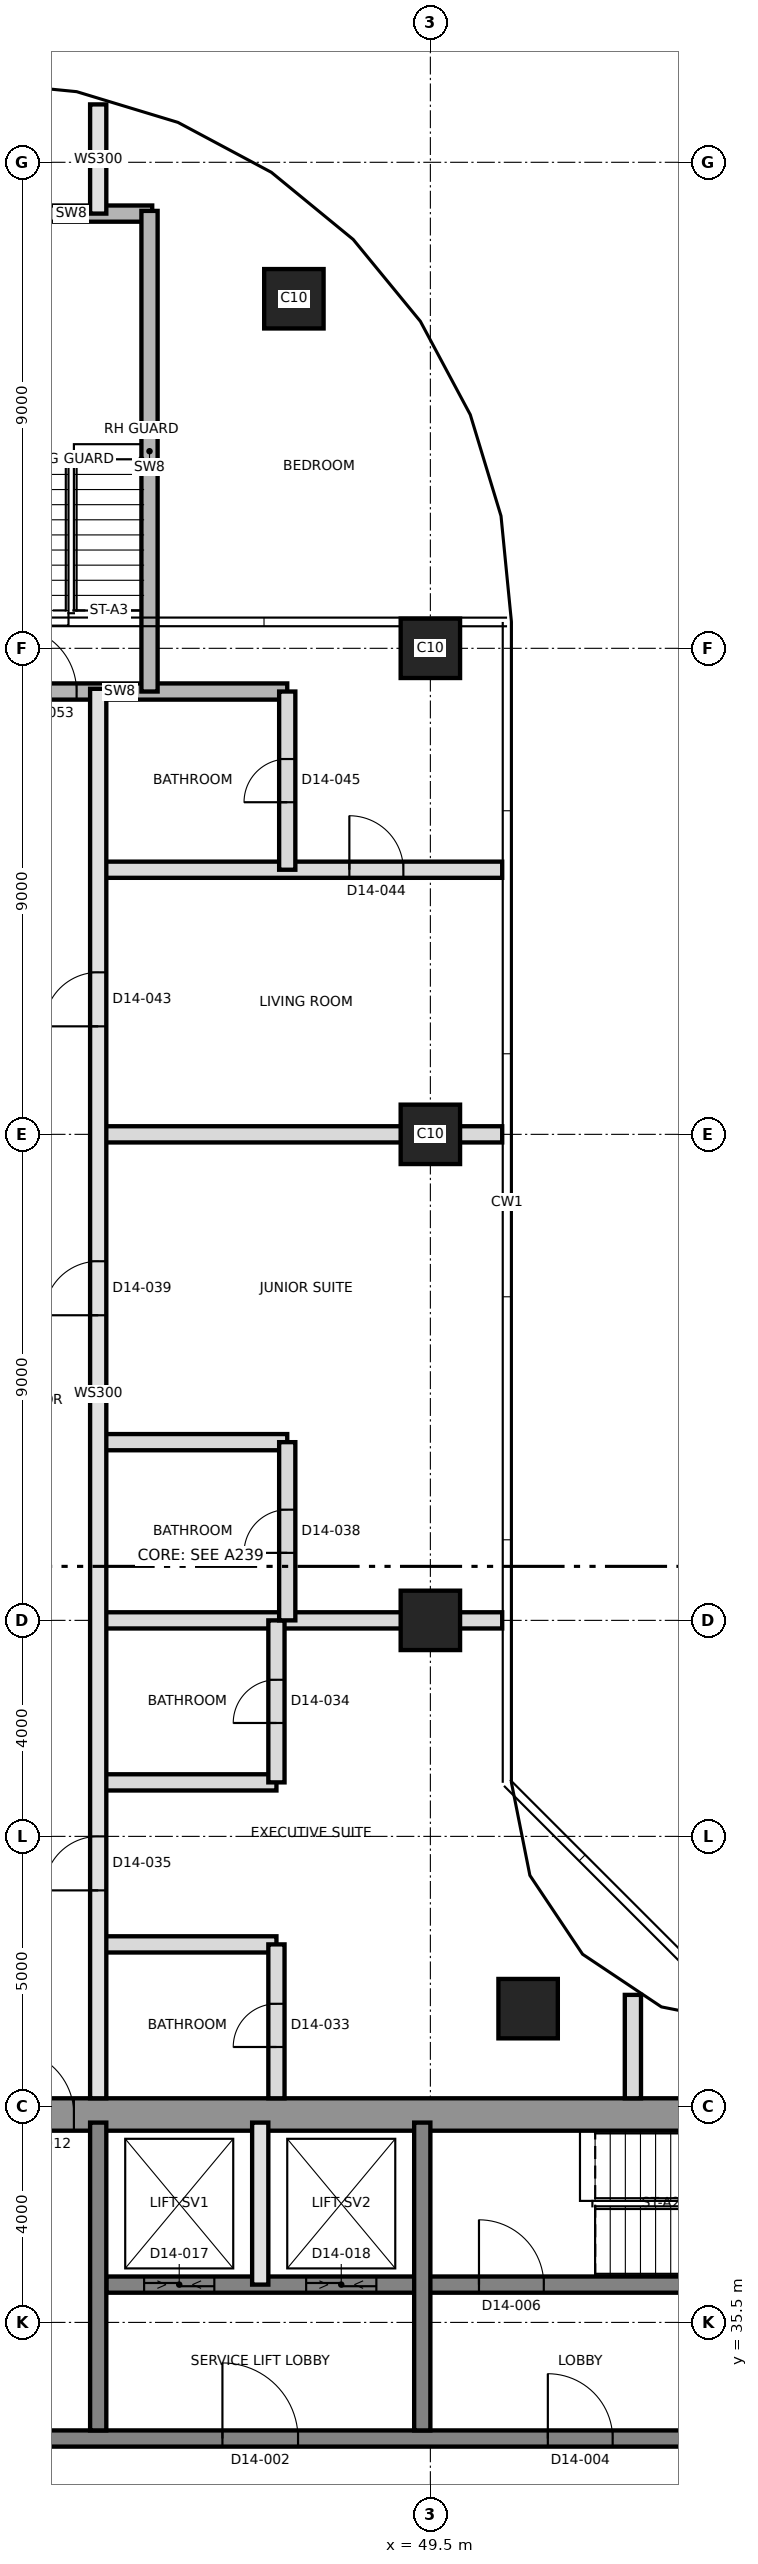
"""IFC4 building model, lengths in metres.
Left out: names, types, materials, properties, quantities, classifications, styles, units other than length and angle.
Written with IfcOpenShell. Run it as: python <this file> out.ifc"""

import sys

from ifc_helpers import new_model, si_unit, direction, frame, frame_2d, origin, origin_2d, place, context, subcontext, project, spatial, rectangle, extrude, element, fill, save


model = new_model("IFC4")
c1 = context("Model", 3, precision=1e-05, world=origin(), true_north=direction((0.0, 1.0)))
c2 = subcontext(c1, "Body", "Model", "MODEL_VIEW")
j1 = project(units=[si_unit("LENGTHUNIT", "METRE"), si_unit("PLANEANGLEUNIT", "RADIAN")], contexts=[c1])
p1 = place(None, origin())
s1 = spatial("IfcSite", under=j1, at=p1, CompositionType="ELEMENT")
p2 = place(p1, origin())
s2 = spatial("IfcBuilding", under=s1, at=p2, CompositionType="ELEMENT")
p3 = place(p2, frame((0.0, 0.0, 149.6)))
s3 = spatial("IfcBuildingStorey", under=s2, at=p3, CompositionType="ELEMENT", Elevation=149.6)
p4 = place(p3, frame((31.2, 39.35, 0.0), z_axis=(0.0, 0.0, 1.0), x_axis=(1.0, 0.0, 0.0)))
e1 = element("IfcWall", 1, at=p4, inside=s3, PredefinedType="SHEAR", context=c2, shape_type="SweptSolid", body=[
    extrude(rectangle(XDim=27.0, YDim=0.6, at=frame_2d((13.5, 0.0))), origin(), (0.0, 0.0, 1.0), 3.7),
])
p5 = place(p4, frame((10.5, 0.0, 0.0)))
e2 = element("IfcOpeningElement", 2, at=p5, cuts=e1, PredefinedType="OPENING", context=c2, shape_type="SweptSolid", body=[
    extrude(rectangle(XDim=1.2, YDim=2.1, at=frame_2d((0.6, 1.05))), frame((0.0, 0.31, 0.0), z_axis=(0.0, -1.0, 0.0), x_axis=(1.0, 0.0, 0.0)), (0.0, 0.0, 1.0), 0.62),
])
p6 = place(p3, frame((31.8, 33.35, 0.0), z_axis=(0.0, 0.0, 1.0), x_axis=(1.0, 0.0, 0.0)))
e3 = element("IfcWall", 3, at=p6, inside=s3, PredefinedType="SHEAR", context=c2, shape_type="SweptSolid", body=[
    extrude(rectangle(XDim=26.4, YDim=0.3, at=frame_2d((13.2, 0.0))), origin(), (0.0, 0.0, 1.0), 3.7),
])
p7 = place(p6, frame((13.85, 0.0, 0.0)))
e4 = element("IfcOpeningElement", 4, at=p7, cuts=e3, PredefinedType="OPENING", context=c2, shape_type="SweptSolid", body=[
    extrude(rectangle(XDim=1.4, YDim=2.1, at=frame_2d((0.7, 1.05))), frame((0.0, 0.16, 0.0), z_axis=(0.0, -1.0, 0.0), x_axis=(1.0, 0.0, 0.0)), (0.0, 0.0, 1.0), 0.32),
])
p8 = place(p6, frame((5.325, 0.0, 0.0)))
e5 = element("IfcOpeningElement", 5, at=p8, cuts=e3, PredefinedType="OPENING", context=c2, shape_type="SweptSolid", body=[
    extrude(rectangle(XDim=1.2, YDim=2.1, at=frame_2d((0.6, 1.05))), frame((0.0, 0.16, 0.0), z_axis=(0.0, -1.0, 0.0), x_axis=(1.0, 0.0, 0.0)), (0.0, 0.0, 1.0), 0.32),
])
p9 = place(p6, frame((19.875, 0.0, 0.0)))
e6 = element("IfcOpeningElement", 6, at=p9, cuts=e3, PredefinedType="OPENING", context=c2, shape_type="SweptSolid", body=[
    extrude(rectangle(XDim=1.2, YDim=2.1, at=frame_2d((0.6, 1.05))), frame((0.0, 0.16, 0.0), z_axis=(0.0, -1.0, 0.0), x_axis=(1.0, 0.0, 0.0)), (0.0, 0.0, 1.0), 0.32),
])
p10 = place(p3, frame((43.5, 36.2, 0.0), z_axis=(0.0, 0.0, 1.0), x_axis=(1.0, 0.0, 0.0)))
e7 = element("IfcWall", 7, at=p10, inside=s3, PredefinedType="SHEAR", context=c2, shape_type="SweptSolid", body=[
    extrude(rectangle(XDim=14.7, YDim=0.3, at=frame_2d((7.35, 0.0))), origin(), (0.0, 0.0, 1.0), 3.7),
])
p11 = place(p10, frame((6.9, 0.0, 0.0)))
e8 = element("IfcOpeningElement", 8, at=p11, cuts=e7, PredefinedType="OPENING", context=c2, shape_type="SweptSolid", body=[
    extrude(rectangle(XDim=1.2, YDim=2.1, at=frame_2d((0.6, 1.05))), frame((0.0, 0.16, 0.0), z_axis=(0.0, -1.0, 0.0), x_axis=(1.0, 0.0, 0.0)), (0.0, 0.0, 1.0), 0.32),
])
p12 = place(p10, frame((0.7, 0.0, 0.0)))
e9 = element("IfcOpeningElement", 9, at=p12, cuts=e7, PredefinedType="OPENING", context=c2, shape_type="SweptSolid", body=[
    extrude(rectangle(XDim=1.3, YDim=2.4, at=frame_2d((0.65, 1.2))), frame((0.0, 0.16, 0.0), z_axis=(0.0, -1.0, 0.0), x_axis=(1.0, 0.0, 0.0)), (0.0, 0.0, 1.0), 0.32),
])
p13 = place(p10, frame((3.7, 0.0, 0.0)))
e10 = element("IfcOpeningElement", 10, at=p13, cuts=e7, PredefinedType="OPENING", context=c2, shape_type="SweptSolid", body=[
    extrude(rectangle(XDim=1.3, YDim=2.4, at=frame_2d((0.65, 1.2))), frame((0.0, 0.16, 0.0), z_axis=(0.0, -1.0, 0.0), x_axis=(1.0, 0.0, 0.0)), (0.0, 0.0, 1.0), 0.32),
])
for number, where, z_axis, x_axis in (
    (11, (43.35, 33.5, 0.0), (0.0, 0.0, 1.0), (0.0, 1.0, 0.0)),
    (12, (49.35, 33.5, 0.0), (0.0, 0.0, 1.0), (0.0, 1.0, 0.0)),
):
    element("IfcWall", number, at=place(p3, frame(where, z_axis=z_axis, x_axis=x_axis)), inside=s3, PredefinedType="SHEAR", context=c2, shape_type="SweptSolid", body=[
        extrude(rectangle(XDim=5.7, YDim=0.3, at=frame_2d((2.85, 0.0))), origin(), (0.0, 0.0, 1.0), 3.7),
    ])
for number, where, z_axis, x_axis in (
    (13, (51.31, 41.31, 0.0), (0.0, 0.0, 1.0), (1.0, 0.0, 0.0)),
    (14, (49.5, 48.5, 0.0), (0.0, 0.0, 1.0), (1.0, 0.0, 0.0)),
    (15, (49.5, 57.5, 0.0), (0.0, 0.0, 1.0), (1.0, 0.0, 0.0)),
    (16, (49.5, 66.5, 0.0), (0.0, 0.0, 1.0), (1.0, 0.0, 0.0)),
    (17, (46.973, 72.973, 0.0), (0.0, 0.0, 1.0), (1.0, 0.0, 0.0)),
):
    element("IfcColumn", number, at=place(p3, frame(where, z_axis=z_axis, x_axis=x_axis)), inside=s3, PredefinedType="COLUMN", context=c2, shape_type="SweptSolid", body=[
        extrude(rectangle(XDim=1.1, YDim=1.1, at=origin_2d()), origin(), (0.0, 0.0, 1.0), 3.7),
    ])
p14 = place(p3, frame((46.35, 36.2, 0.0), z_axis=(0.0, 0.0, 1.0), x_axis=(0.0, 1.0, 0.0)))
e18 = element("IfcWall", 18, at=p14, inside=s3, PredefinedType="SOLIDWALL", context=c2, shape_type="SweptSolid", body=[
    extrude(rectangle(XDim=3.0, YDim=0.3, at=frame_2d((1.5, 0.0))), origin(), (0.0, 0.0, 1.0), 3.4),
])
for number, where, z_axis, x_axis in (
    (19, (43.35, 42.5, 0.0), (0.0, 0.0, 1.0), (1.0, 0.0, 0.0)),
    (20, (43.35, 45.5, 0.0), (0.0, 0.0, 1.0), (1.0, 0.0, 0.0)),
):
    element("IfcWall", number, at=place(p3, frame(where, z_axis=z_axis, x_axis=x_axis)), inside=s3, PredefinedType="PARTITIONING", context=c2, shape_type="SweptSolid", body=[
        extrude(rectangle(XDim=3.3, YDim=0.3, at=frame_2d((1.65, 0.0))), origin(), (0.0, 0.0, 1.0), 3.4),
    ])
p15 = place(p3, frame((43.35, 48.5, 0.0), z_axis=(0.0, 0.0, 1.0), x_axis=(1.0, 0.0, 0.0)))
e21 = element("IfcWall", 21, at=p15, inside=s3, PredefinedType="PARTITIONING", context=c2, shape_type="SweptSolid", body=[
    extrude(rectangle(XDim=7.48, YDim=0.3, at=frame_2d((3.74, 0.0))), origin(), (0.0, 0.0, 1.0), 3.35),
])
p16 = place(p3, frame((43.35, 51.8, 0.0), z_axis=(0.0, 0.0, 1.0), x_axis=(1.0, 0.0, 0.0)))
e22 = element("IfcWall", 22, at=p16, inside=s3, PredefinedType="PARTITIONING", context=c2, shape_type="SweptSolid", body=[
    extrude(rectangle(XDim=3.5, YDim=0.3, at=frame_2d((1.75, 0.0))), origin(), (0.0, 0.0, 1.0), 3.4),
])
p17 = place(p3, frame((43.35, 57.5, 0.0), z_axis=(0.0, 0.0, 1.0), x_axis=(1.0, 0.0, 0.0)))
e23 = element("IfcWall", 23, at=p17, inside=s3, PredefinedType="PARTITIONING", context=c2, shape_type="SweptSolid", body=[
    extrude(rectangle(XDim=7.48, YDim=0.3, at=frame_2d((3.74, 0.0))), origin(), (0.0, 0.0, 1.0), 3.35),
])
p18 = place(p3, frame((43.35, 62.4, 0.0), z_axis=(0.0, 0.0, 1.0), x_axis=(1.0, 0.0, 0.0)))
e24 = element("IfcWall", 24, at=p18, inside=s3, PredefinedType="PARTITIONING", context=c2, shape_type="SweptSolid", body=[
    extrude(rectangle(XDim=7.48, YDim=0.3, at=frame_2d((3.74, 0.0))), origin(), (0.0, 0.0, 1.0), 3.35),
])
p19 = place(p18, frame((4.65, 0.0, 0.0)))
e25 = element("IfcOpeningElement", 25, at=p19, cuts=e24, PredefinedType="OPENING", context=c2, shape_type="SweptSolid", body=[
    extrude(rectangle(XDim=1.0, YDim=2.1, at=frame_2d((0.5, 1.05))), frame((0.0, 0.16, 0.0), z_axis=(0.0, -1.0, 0.0), x_axis=(1.0, 0.0, 0.0)), (0.0, 0.0, 1.0), 0.32),
])
p20 = place(p3, frame((40.65, 65.7, 0.0), z_axis=(0.0, 0.0, 1.0), x_axis=(1.0, 0.0, 0.0)))
e26 = element("IfcWall", 26, at=p20, inside=s3, PredefinedType="SHEAR", context=c2, shape_type="SweptSolid", body=[
    extrude(rectangle(XDim=6.2, YDim=0.3, at=frame_2d((3.1, 0.0))), origin(), (0.0, 0.0, 1.0), 3.4),
])
p21 = place(p20, frame((1.1, 0.0, 0.0)))
e27 = element("IfcOpeningElement", 27, at=p21, cuts=e26, PredefinedType="OPENING", context=c2, shape_type="SweptSolid", body=[
    extrude(rectangle(XDim=1.2, YDim=2.1, at=frame_2d((0.6, 1.05))), frame((0.0, 0.16, 0.0), z_axis=(0.0, -1.0, 0.0), x_axis=(1.0, 0.0, 0.0)), (0.0, 0.0, 1.0), 0.32),
])
p22 = place(p3, frame((41.35, 74.55, 0.0), z_axis=(0.0, 0.0, 1.0), x_axis=(1.0, 0.0, 0.0)))
e28 = element("IfcWall", 28, at=p22, inside=s3, PredefinedType="SHEAR", context=c2, shape_type="SweptSolid", body=[
    extrude(rectangle(XDim=3.0, YDim=0.3, at=frame_2d((1.5, 0.0))), origin(), (0.0, 0.0, 1.0), 3.4),
])
p23 = place(p3, frame((43.35, 39.65, 0.0), z_axis=(0.0, 0.0, 1.0), x_axis=(0.0, 1.0, 0.0)))
e29 = element("IfcWall", 29, at=p23, inside=s3, PredefinedType="SOLIDWALL", context=c2, shape_type="SweptSolid", body=[
    extrude(rectangle(XDim=26.1, YDim=0.3, at=frame_2d((13.05, 0.0))), origin(), (0.0, 0.0, 1.0), 3.4),
])
p24 = place(p23, frame((3.85, 0.0, 0.0)))
e30 = element("IfcOpeningElement", 30, at=p24, cuts=e29, PredefinedType="OPENING", context=c2, shape_type="SweptSolid", body=[
    extrude(rectangle(XDim=1.0, YDim=2.4, at=frame_2d((0.5, 1.2))), frame((0.0, 0.16, 0.0), z_axis=(0.0, -1.0, 0.0), x_axis=(1.0, 0.0, 0.0)), (0.0, 0.0, 1.0), 0.32),
])
p25 = place(p23, frame((14.5, 0.0, 0.0)))
e31 = element("IfcOpeningElement", 31, at=p25, cuts=e29, PredefinedType="OPENING", context=c2, shape_type="SweptSolid", body=[
    extrude(rectangle(XDim=1.0, YDim=2.4, at=frame_2d((0.5, 1.2))), frame((0.0, 0.16, 0.0), z_axis=(0.0, -1.0, 0.0), x_axis=(1.0, 0.0, 0.0)), (0.0, 0.0, 1.0), 0.32),
])
p26 = place(p23, frame((19.85, 0.0, 0.0)))
e32 = element("IfcOpeningElement", 32, at=p26, cuts=e29, PredefinedType="OPENING", context=c2, shape_type="SweptSolid", body=[
    extrude(rectangle(XDim=1.0, YDim=2.4, at=frame_2d((0.5, 1.2))), frame((0.0, 0.16, 0.0), z_axis=(0.0, -1.0, 0.0), x_axis=(1.0, 0.0, 0.0)), (0.0, 0.0, 1.0), 0.32),
])
p27 = place(p3, frame((43.35, 74.55, 0.0), z_axis=(0.0, 0.0, 1.0), x_axis=(0.0, 1.0, 0.0)))
e33 = element("IfcWall", 33, at=p27, inside=s3, PredefinedType="SOLIDWALL", context=c2, shape_type="SweptSolid", body=[
    extrude(rectangle(XDim=2.022, YDim=0.3, at=frame_2d((1.011, 0.0))), origin(), (0.0, 0.0, 1.0), 3.35),
])
p28 = place(p3, frame((44.3, 65.7, 0.0), z_axis=(0.0, 0.0, 1.0), x_axis=(0.0, 1.0, 0.0)))
e34 = element("IfcWall", 34, at=p28, inside=s3, PredefinedType="SHEAR", context=c2, shape_type="SweptSolid", body=[
    extrude(rectangle(XDim=8.9, YDim=0.3, at=frame_2d((4.45, 0.0))), origin(), (0.0, 0.0, 1.0), 3.4),
])
p29 = place(p3, frame((46.65, 39.65, 0.0), z_axis=(0.0, 0.0, 1.0), x_axis=(0.0, 1.0, 0.0)))
e35 = element("IfcWall", 35, at=p29, inside=s3, PredefinedType="PARTITIONING", context=c2, shape_type="SweptSolid", body=[
    extrude(rectangle(XDim=2.85, YDim=0.3, at=frame_2d((1.425, 0.0))), origin(), (0.0, 0.0, 1.0), 3.4),
])
p30 = place(p29, frame((0.95, 0.0, 0.0)))
e36 = element("IfcOpeningElement", 36, at=p30, cuts=e35, PredefinedType="OPENING", context=c2, shape_type="SweptSolid", body=[
    extrude(rectangle(XDim=0.8, YDim=2.1, at=frame_2d((0.4, 1.05))), frame((0.0, 0.16, 0.0), z_axis=(0.0, -1.0, 0.0), x_axis=(1.0, 0.0, 0.0)), (0.0, 0.0, 1.0), 0.32),
])
p31 = place(p3, frame((46.65, 45.5, 0.0), z_axis=(0.0, 0.0, 1.0), x_axis=(0.0, 1.0, 0.0)))
e37 = element("IfcWall", 37, at=p31, inside=s3, PredefinedType="PARTITIONING", context=c2, shape_type="SweptSolid", body=[
    extrude(rectangle(XDim=3.0, YDim=0.3, at=frame_2d((1.5, 0.0))), origin(), (0.0, 0.0, 1.0), 3.4),
])
p32 = place(p31, frame((1.1, 0.0, 0.0)))
e38 = element("IfcOpeningElement", 38, at=p32, cuts=e37, PredefinedType="OPENING", context=c2, shape_type="SweptSolid", body=[
    extrude(rectangle(XDim=0.8, YDim=2.1, at=frame_2d((0.4, 1.05))), frame((0.0, 0.16, 0.0), z_axis=(0.0, -1.0, 0.0), x_axis=(1.0, 0.0, 0.0)), (0.0, 0.0, 1.0), 0.32),
])
p33 = place(p3, frame((46.85, 48.5, 0.0), z_axis=(0.0, 0.0, 1.0), x_axis=(0.0, 1.0, 0.0)))
e39 = element("IfcWall", 39, at=p33, inside=s3, PredefinedType="PARTITIONING", context=c2, shape_type="SweptSolid", body=[
    extrude(rectangle(XDim=3.3, YDim=0.3, at=frame_2d((1.65, 0.0))), origin(), (0.0, 0.0, 1.0), 3.4),
])
p34 = place(p33, frame((1.25, 0.0, 0.0)))
e40 = element("IfcOpeningElement", 40, at=p34, cuts=e39, PredefinedType="OPENING", context=c2, shape_type="SweptSolid", body=[
    extrude(rectangle(XDim=0.8, YDim=2.1, at=frame_2d((0.4, 1.05))), frame((0.0, 0.16, 0.0), z_axis=(0.0, -1.0, 0.0), x_axis=(1.0, 0.0, 0.0)), (0.0, 0.0, 1.0), 0.32),
])
p35 = place(p3, frame((46.85, 62.4, 0.0), z_axis=(0.0, 0.0, 1.0), x_axis=(0.0, 1.0, 0.0)))
e41 = element("IfcWall", 41, at=p35, inside=s3, PredefinedType="PARTITIONING", context=c2, shape_type="SweptSolid", body=[
    extrude(rectangle(XDim=3.3, YDim=0.3, at=frame_2d((1.65, 0.0))), origin(), (0.0, 0.0, 1.0), 3.4),
])
p36 = place(p35, frame((1.25, 0.0, 0.0)))
e42 = element("IfcOpeningElement", 42, at=p36, cuts=e41, PredefinedType="OPENING", context=c2, shape_type="SweptSolid", body=[
    extrude(rectangle(XDim=0.8, YDim=2.1, at=frame_2d((0.4, 1.05))), frame((0.0, 0.16, 0.0), z_axis=(0.0, -1.0, 0.0), x_axis=(1.0, 0.0, 0.0)), (0.0, 0.0, 1.0), 0.32),
])
p37 = place(p3, frame((53.25, 39.65, 0.0), z_axis=(0.0, 0.0, 1.0), x_axis=(0.0, 1.0, 0.0)))
e43 = element("IfcWall", 43, at=p37, inside=s3, PredefinedType="PARTITIONING", context=c2, shape_type="SweptSolid", body=[
    extrude(rectangle(XDim=1.915, YDim=0.3, at=frame_2d((0.958, 0.0))), origin(), (0.0, 0.0, 1.0), 3.35),
])
p38 = place(p7, origin())
e44 = element("IfcDoor", 44, at=p38, inside=s3, OperationType="SINGLE_SWING_RIGHT", PredefinedType="DOOR", context=c2, shape_type="SweptSolid", body=[
    extrude(rectangle(XDim=1.4, YDim=2.1, at=frame_2d((0.7, 1.05))), frame((0.0, 0.025, 0.0), z_axis=(0.0, -1.0, 0.0), x_axis=(1.0, 0.0, 0.0)), (0.0, 0.0, 1.0), 0.05),
])
fill(e4, e44)
p39 = place(p9, origin())
e45 = element("IfcDoor", 45, at=p39, inside=s3, OperationType="SINGLE_SWING_RIGHT", PredefinedType="DOOR", context=c2, shape_type="SweptSolid", body=[
    extrude(rectangle(XDim=1.2, YDim=2.1, at=frame_2d((0.6, 1.05))), frame((0.0, 0.025, 0.0), z_axis=(0.0, -1.0, 0.0), x_axis=(1.0, 0.0, 0.0)), (0.0, 0.0, 1.0), 0.05),
])
fill(e6, e45)
p40 = place(p11, origin())
e46 = element("IfcDoor", 46, at=p40, inside=s3, OperationType="SINGLE_SWING_LEFT", PredefinedType="DOOR", context=c2, shape_type="SweptSolid", body=[
    extrude(rectangle(XDim=1.2, YDim=2.1, at=frame_2d((0.6, 1.05))), frame((0.0, 0.025, 0.0), z_axis=(0.0, -1.0, 0.0), x_axis=(1.0, 0.0, 0.0)), (0.0, 0.0, 1.0), 0.05),
])
fill(e8, e46)
p41 = place(p5, origin())
e47 = element("IfcDoor", 47, at=p41, inside=s3, OperationType="SINGLE_SWING_RIGHT", PredefinedType="DOOR", context=c2, shape_type="SweptSolid", body=[
    extrude(rectangle(XDim=1.2, YDim=2.1, at=frame_2d((0.6, 1.05))), frame((0.0, 0.025, 0.0), z_axis=(0.0, -1.0, 0.0), x_axis=(1.0, 0.0, 0.0)), (0.0, 0.0, 1.0), 0.05),
])
fill(e2, e47)
p42 = place(p12, origin())
e48 = element("IfcDoor", 48, at=p42, inside=s3, OperationType="SLIDING_TO_LEFT", PredefinedType="DOOR", context=c2, shape_type="SweptSolid", body=[
    extrude(rectangle(XDim=1.3, YDim=2.4, at=frame_2d((0.65, 1.2))), frame((0.0, 0.025, 0.0), z_axis=(0.0, -1.0, 0.0), x_axis=(1.0, 0.0, 0.0)), (0.0, 0.0, 1.0), 0.05),
])
fill(e9, e48)
p43 = place(p13, origin())
e49 = element("IfcDoor", 49, at=p43, inside=s3, OperationType="SLIDING_TO_LEFT", PredefinedType="DOOR", context=c2, shape_type="SweptSolid", body=[
    extrude(rectangle(XDim=1.3, YDim=2.4, at=frame_2d((0.65, 1.2))), frame((0.0, 0.025, 0.0), z_axis=(0.0, -1.0, 0.0), x_axis=(1.0, 0.0, 0.0)), (0.0, 0.0, 1.0), 0.05),
])
fill(e10, e49)
p44 = place(p30, origin())
e50 = element("IfcDoor", 50, at=p44, inside=s3, OperationType="SINGLE_SWING_RIGHT", PredefinedType="DOOR", context=c2, shape_type="SweptSolid", body=[
    extrude(rectangle(XDim=0.8, YDim=2.1, at=frame_2d((0.4, 1.05))), frame((0.0, 0.025, 0.0), z_axis=(0.0, -1.0, 0.0), x_axis=(1.0, 0.0, 0.0)), (0.0, 0.0, 1.0), 0.05),
])
fill(e36, e50)
p45 = place(p32, origin())
e51 = element("IfcDoor", 51, at=p45, inside=s3, OperationType="SINGLE_SWING_LEFT", PredefinedType="DOOR", context=c2, shape_type="SweptSolid", body=[
    extrude(rectangle(XDim=0.8, YDim=2.1, at=frame_2d((0.4, 1.05))), frame((0.0, 0.025, 0.0), z_axis=(0.0, -1.0, 0.0), x_axis=(1.0, 0.0, 0.0)), (0.0, 0.0, 1.0), 0.05),
])
fill(e38, e51)
p46 = place(p24, origin())
e52 = element("IfcDoor", 52, at=p46, inside=s3, OperationType="SINGLE_SWING_LEFT", PredefinedType="DOOR", context=c2, shape_type="SweptSolid", body=[
    extrude(rectangle(XDim=1.0, YDim=2.4, at=frame_2d((0.5, 1.2))), frame((0.0, 0.025, 0.0), z_axis=(0.0, -1.0, 0.0), x_axis=(1.0, 0.0, 0.0)), (0.0, 0.0, 1.0), 0.05),
])
fill(e30, e52)
p47 = place(p34, origin())
e53 = element("IfcDoor", 53, at=p47, inside=s3, OperationType="SINGLE_SWING_LEFT", PredefinedType="DOOR", context=c2, shape_type="SweptSolid", body=[
    extrude(rectangle(XDim=0.8, YDim=2.1, at=frame_2d((0.4, 1.05))), frame((0.0, 0.025, 0.0), z_axis=(0.0, -1.0, 0.0), x_axis=(1.0, 0.0, 0.0)), (0.0, 0.0, 1.0), 0.05),
])
fill(e40, e53)
p48 = place(p25, origin())
e54 = element("IfcDoor", 54, at=p48, inside=s3, OperationType="SINGLE_SWING_LEFT", PredefinedType="DOOR", context=c2, shape_type="SweptSolid", body=[
    extrude(rectangle(XDim=1.0, YDim=2.4, at=frame_2d((0.5, 1.2))), frame((0.0, 0.025, 0.0), z_axis=(0.0, -1.0, 0.0), x_axis=(1.0, 0.0, 0.0)), (0.0, 0.0, 1.0), 0.05),
])
fill(e31, e54)
p49 = place(p26, origin())
e55 = element("IfcDoor", 55, at=p49, inside=s3, OperationType="SINGLE_SWING_RIGHT", PredefinedType="DOOR", context=c2, shape_type="SweptSolid", body=[
    extrude(rectangle(XDim=1.0, YDim=2.4, at=frame_2d((0.5, 1.2))), frame((0.0, 0.025, 0.0), z_axis=(0.0, -1.0, 0.0), x_axis=(1.0, 0.0, 0.0)), (0.0, 0.0, 1.0), 0.05),
])
fill(e32, e55)
p50 = place(p19, origin())
e56 = element("IfcDoor", 56, at=p50, inside=s3, OperationType="SINGLE_SWING_LEFT", PredefinedType="DOOR", context=c2, shape_type="SweptSolid", body=[
    extrude(rectangle(XDim=1.0, YDim=2.1, at=frame_2d((0.5, 1.05))), frame((0.0, 0.025, 0.0), z_axis=(0.0, -1.0, 0.0), x_axis=(1.0, 0.0, 0.0)), (0.0, 0.0, 1.0), 0.05),
])
fill(e25, e56)
p51 = place(p36, origin())
e57 = element("IfcDoor", 57, at=p51, inside=s3, OperationType="SINGLE_SWING_LEFT", PredefinedType="DOOR", context=c2, shape_type="SweptSolid", body=[
    extrude(rectangle(XDim=0.8, YDim=2.1, at=frame_2d((0.4, 1.05))), frame((0.0, 0.025, 0.0), z_axis=(0.0, -1.0, 0.0), x_axis=(1.0, 0.0, 0.0)), (0.0, 0.0, 1.0), 0.05),
])
fill(e42, e57)
p52 = place(p21, origin())
e58 = element("IfcDoor", 58, at=p52, inside=s3, OperationType="SINGLE_SWING_RIGHT", PredefinedType="DOOR", context=c2, shape_type="SweptSolid", body=[
    extrude(rectangle(XDim=1.2, YDim=2.1, at=frame_2d((0.6, 1.05))), frame((0.0, 0.025, 0.0), z_axis=(0.0, -1.0, 0.0), x_axis=(1.0, 0.0, 0.0)), (0.0, 0.0, 1.0), 0.05),
])
fill(e27, e58)
save(model, sys.argv[1])
